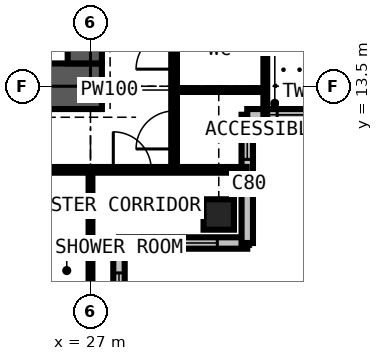
"""IFC4 building model, lengths in metres.
Left out: names, types, materials, properties, quantities, classifications, styles, units other than length and angle.
Written with IfcOpenShell. Run it as: python <this file> out.ifc"""

import sys

from ifc_helpers import new_model, si_unit, direction, frame, frame_2d, origin, origin_2d, place, context, subcontext, project, spatial, rectangle, extrude, element, fill, save


model = new_model("IFC4")
c1 = context("Model", 3, precision=1e-05, world=origin(), true_north=direction((0.0, 1.0)))
c2 = subcontext(c1, "Body", "Model", "MODEL_VIEW")
j1 = project(units=[si_unit("LENGTHUNIT", "METRE"), si_unit("PLANEANGLEUNIT", "RADIAN")], contexts=[c1])
p1 = place(None, origin())
s1 = spatial("IfcSite", under=j1, at=p1, CompositionType="ELEMENT")
p2 = place(p1, origin())
s2 = spatial("IfcBuilding", under=s1, at=p2, CompositionType="ELEMENT")
p3 = place(p2, frame((0.0, 0.0, 251.1)))
s3 = spatial("IfcBuildingStorey", under=s2, at=p3, CompositionType="ELEMENT", Elevation=251.1)
p4 = place(p3, frame((30.375, 10.125, 0.0), z_axis=(0.0, 0.0, 1.0), x_axis=(1.0, 0.0, 0.0)))
e1 = element("IfcColumn", 1, at=p4, inside=s3, PredefinedType="COLUMN", context=c2, shape_type="SweptSolid", body=[
    extrude(rectangle(XDim=0.8, YDim=0.8, at=origin_2d()), origin(), (0.0, 0.0, 1.0), 3.6),
])
p5 = place(p3, frame((13.2, 13.5, 0.0), z_axis=(0.0, 0.0, 1.0), x_axis=(1.0, 0.0, 0.0)))
e2 = element("IfcWall", 2, at=p5, inside=s3, PredefinedType="SHEAR", context=c2, shape_type="SweptSolid", body=[
    extrude(rectangle(XDim=14.1, YDim=1.2, at=frame_2d((7.05, 0.0))), origin(), (0.0, 0.0, 1.0), 3.6),
])
p6 = place(p3, frame((26.85, 14.1, 0.0), z_axis=(0.0, 0.0, 1.0), x_axis=(0.0, 1.0, 0.0)))
e3 = element("IfcWall", 3, at=p6, inside=s3, PredefinedType="SHEAR", context=c2, shape_type="SweptSolid", body=[
    extrude(rectangle(XDim=12.3, YDim=0.9, at=frame_2d((6.15, 0.0))), origin(), (0.0, 0.0, 1.0), 3.6),
])
p7 = place(p6, frame((3.65, 0.0, 0.0)))
e4 = element("IfcOpeningElement", 4, at=p7, cuts=e3, PredefinedType="OPENING", context=c2, shape_type="SweptSolid", body=[
    extrude(rectangle(XDim=1.2, YDim=2.2, at=frame_2d((0.6, 1.1))), frame((0.0, 0.46, 0.0), z_axis=(0.0, -1.0, 0.0), x_axis=(1.0, 0.0, 0.0)), (0.0, 0.0, 1.0), 0.92),
])
p8 = place(p3, frame((27.75, 6.0, 0.0), z_axis=(0.0, 0.0, 1.0), x_axis=(0.0, 1.0, 0.0)))
e5 = element("IfcWall", 5, at=p8, inside=s3, PredefinedType="SOLIDWALL", context=c2, shape_type="SweptSolid", body=[
    extrude(rectangle(XDim=3.375, YDim=0.3, at=frame_2d((1.688, 0.0))), origin(), (0.0, 0.0, 1.0), 3.3),
])
p9 = place(p8, frame((0.788, 0.0, 0.6)))
e6 = element("IfcOpeningElement", 6, at=p9, cuts=e5, PredefinedType="OPENING", context=c2, shape_type="SweptSolid", body=[
    extrude(rectangle(XDim=1.8, YDim=2.1, at=frame_2d((0.9, 1.05))), frame((0.0, 0.16, 0.0), z_axis=(0.0, -1.0, 0.0), x_axis=(1.0, 0.0, 0.0)), (0.0, 0.0, 1.0), 0.32),
])
p10 = place(p3, frame((27.75, 9.375, 0.0), z_axis=(0.0, 0.0, 1.0), x_axis=(1.0, 0.0, 0.0)))
e7 = element("IfcWall", 7, at=p10, inside=s3, PredefinedType="SOLIDWALL", context=c2, shape_type="SweptSolid", body=[
    extrude(rectangle(XDim=3.375, YDim=0.3, at=frame_2d((1.688, 0.0))), origin(), (0.0, 0.0, 1.0), 3.3),
])
p11 = place(p10, frame((0.788, 0.0, 0.6)))
e8 = element("IfcOpeningElement", 8, at=p11, cuts=e7, PredefinedType="OPENING", context=c2, shape_type="SweptSolid", body=[
    extrude(rectangle(XDim=1.8, YDim=2.1, at=frame_2d((0.9, 1.05))), frame((0.0, 0.16, 0.0), z_axis=(0.0, -1.0, 0.0), x_axis=(1.0, 0.0, 0.0)), (0.0, 0.0, 1.0), 0.32),
])
p12 = place(p3, frame((31.125, 9.375, 0.0), z_axis=(0.0, 0.0, 1.0), x_axis=(0.0, 1.0, 0.0)))
e9 = element("IfcWall", 9, at=p12, inside=s3, PredefinedType="SOLIDWALL", context=c2, shape_type="SweptSolid", body=[
    extrude(rectangle(XDim=3.375, YDim=0.3, at=frame_2d((1.688, 0.0))), origin(), (0.0, 0.0, 1.0), 3.3),
])
p13 = place(p12, frame((2.2, 0.0, 0.9)))
e10 = element("IfcOpeningElement", 10, at=p13, cuts=e9, PredefinedType="OPENING", context=c2, shape_type="SweptSolid", body=[
    extrude(rectangle(XDim=0.9, YDim=1.8, at=frame_2d((0.45, 0.9))), frame((0.0, 0.16, 0.0), z_axis=(0.0, -1.0, 0.0), x_axis=(1.0, 0.0, 0.0)), (0.0, 0.0, 1.0), 0.32),
])
p14 = place(p3, frame((31.125, 12.75, 0.0), z_axis=(0.0, 0.0, 1.0), x_axis=(1.0, 0.0, 0.0)))
e11 = element("IfcWall", 11, at=p14, inside=s3, PredefinedType="SOLIDWALL", context=c2, shape_type="SweptSolid", body=[
    extrude(rectangle(XDim=3.375, YDim=0.3, at=frame_2d((1.688, 0.0))), origin(), (0.0, 0.0, 1.0), 3.3),
])
p15 = place(p14, frame((0.788, 0.0, 0.6)))
e12 = element("IfcOpeningElement", 12, at=p15, cuts=e11, PredefinedType="OPENING", context=c2, shape_type="SweptSolid", body=[
    extrude(rectangle(XDim=1.8, YDim=2.1, at=frame_2d((0.9, 1.05))), frame((0.0, 0.16, 0.0), z_axis=(0.0, -1.0, 0.0), x_axis=(1.0, 0.0, 0.0)), (0.0, 0.0, 1.0), 0.32),
])
p16 = place(p3, frame((10.125, 11.3, 0.0), z_axis=(0.0, 0.0, 1.0), x_axis=(1.0, 0.0, 0.0)))
e13 = element("IfcWall", 13, at=p16, inside=s3, PredefinedType="PARTITIONING", context=c2, shape_type="SweptSolid", body=[
    extrude(rectangle(XDim=20.984, YDim=0.15, at=frame_2d((10.492, 0.0))), origin(), (0.0, 0.0, 1.0), 3.3),
])
p17 = place(p16, frame((3.625, 0.0, 0.0)))
e14 = element("IfcOpeningElement", 14, at=p17, cuts=e13, PredefinedType="OPENING", context=c2, shape_type="SweptSolid", body=[
    extrude(rectangle(XDim=0.95, YDim=2.2, at=frame_2d((0.475, 1.1))), frame((0.0, 0.085, 0.0), z_axis=(0.0, -1.0, 0.0), x_axis=(1.0, 0.0, 0.0)), (0.0, 0.0, 1.0), 0.17),
])
p18 = place(p16, frame((7.0, 0.0, 0.0)))
e15 = element("IfcOpeningElement", 15, at=p18, cuts=e13, PredefinedType="OPENING", context=c2, shape_type="SweptSolid", body=[
    extrude(rectangle(XDim=0.95, YDim=2.2, at=frame_2d((0.475, 1.1))), frame((0.0, 0.085, 0.0), z_axis=(0.0, -1.0, 0.0), x_axis=(1.0, 0.0, 0.0)), (0.0, 0.0, 1.0), 0.17),
])
p19 = place(p16, frame((10.375, 0.0, 0.0)))
e16 = element("IfcOpeningElement", 16, at=p19, cuts=e13, PredefinedType="OPENING", context=c2, shape_type="SweptSolid", body=[
    extrude(rectangle(XDim=0.95, YDim=2.2, at=frame_2d((0.475, 1.1))), frame((0.0, 0.085, 0.0), z_axis=(0.0, -1.0, 0.0), x_axis=(1.0, 0.0, 0.0)), (0.0, 0.0, 1.0), 0.17),
])
p20 = place(p16, frame((13.75, 0.0, 0.0)))
e17 = element("IfcOpeningElement", 17, at=p20, cuts=e13, PredefinedType="OPENING", context=c2, shape_type="SweptSolid", body=[
    extrude(rectangle(XDim=0.95, YDim=2.2, at=frame_2d((0.475, 1.1))), frame((0.0, 0.085, 0.0), z_axis=(0.0, -1.0, 0.0), x_axis=(1.0, 0.0, 0.0)), (0.0, 0.0, 1.0), 0.17),
])
p21 = place(p16, frame((17.475, 0.0, 0.0)))
e18 = element("IfcOpeningElement", 18, at=p21, cuts=e13, PredefinedType="OPENING", context=c2, shape_type="SweptSolid", body=[
    extrude(rectangle(XDim=1.0, YDim=2.2, at=frame_2d((0.5, 1.1))), frame((0.0, 0.085, 0.0), z_axis=(0.0, -1.0, 0.0), x_axis=(1.0, 0.0, 0.0)), (0.0, 0.0, 1.0), 0.17),
])
p22 = place(p3, frame((25.0, 9.1, 0.0), z_axis=(0.0, 0.0, 1.0), x_axis=(1.0, 0.0, 0.0)))
e19 = element("IfcWall", 19, at=p22, inside=s3, PredefinedType="PARTITIONING", context=c2, shape_type="SweptSolid", body=[
    extrude(rectangle(XDim=2.0, YDim=0.1, at=frame_2d((1.0, 0.0))), origin(), (0.0, 0.0, 1.0), 3.3),
])
p23 = place(p3, frame((27.0, 6.016, 0.0), z_axis=(0.0, 0.0, 1.0), x_axis=(0.0, 1.0, 0.0)))
e20 = element("IfcWall", 20, at=p23, inside=s3, PredefinedType="PARTITIONING", context=c2, shape_type="SweptSolid", body=[
    extrude(rectangle(XDim=3.084, YDim=0.1, at=frame_2d((1.542, 0.0))), origin(), (0.0, 0.0, 1.0), 2.802),
])
p24 = place(p23, frame((1.25, 0.0, 0.0)))
e21 = element("IfcOpeningElement", 21, at=p24, cuts=e20, PredefinedType="OPENING", context=c2, shape_type="SweptSolid", body=[
    extrude(rectangle(XDim=0.9, YDim=2.2, at=frame_2d((0.45, 1.1))), frame((0.0, 0.06, 0.0), z_axis=(0.0, -1.0, 0.0), x_axis=(1.0, 0.0, 0.0)), (0.0, 0.0, 1.0), 0.12),
])
p25 = place(p3, frame((27.0, 9.375, 0.0), z_axis=(0.0, 0.0, 1.0), x_axis=(0.0, 1.0, 0.0)))
e22 = element("IfcWall", 22, at=p25, inside=s3, PredefinedType="PARTITIONING", context=c2, shape_type="SweptSolid", body=[
    extrude(rectangle(XDim=1.925, YDim=0.1, at=frame_2d((0.962, 0.0))), origin(), (0.0, 0.0, 1.0), 2.802),
])
p26 = place(p3, frame((27.0, 9.375, 0.0), z_axis=(0.0, 0.0, 1.0), x_axis=(1.0, 0.0, 0.0)))
e23 = element("IfcWall", 23, at=p26, inside=s3, PredefinedType="PARTITIONING", context=c2, shape_type="SweptSolid", body=[
    extrude(rectangle(XDim=0.734, YDim=0.1, at=frame_2d((0.367, 0.0))), origin(), (0.0, 0.0, 1.0), 3.3),
])
p27 = place(p3, frame((29.2, 11.3, 0.0), z_axis=(0.0, 0.0, 1.0), x_axis=(0.0, 1.0, 0.0)))
e24 = element("IfcWall", 24, at=p27, inside=s3, PredefinedType="PARTITIONING", context=c2, shape_type="SweptSolid", body=[
    extrude(rectangle(XDim=19.809, YDim=0.15, at=frame_2d((9.904, 0.0))), origin(), (0.0, 0.0, 1.0), 3.3),
])
p28 = place(p27, frame((0.55, 0.0, 0.0)))
e25 = element("IfcOpeningElement", 25, at=p28, cuts=e24, PredefinedType="OPENING", context=c2, shape_type="SweptSolid", body=[
    extrude(rectangle(XDim=1.0, YDim=2.2, at=frame_2d((0.5, 1.1))), frame((0.0, 0.085, 0.0), z_axis=(0.0, -1.0, 0.0), x_axis=(1.0, 0.0, 0.0)), (0.0, 0.0, 1.0), 0.17),
])
p29 = place(p27, frame((2.65, 0.0, 0.0)))
e26 = element("IfcOpeningElement", 26, at=p29, cuts=e24, PredefinedType="OPENING", context=c2, shape_type="SweptSolid", body=[
    extrude(rectangle(XDim=1.0, YDim=2.2, at=frame_2d((0.5, 1.1))), frame((0.0, 0.085, 0.0), z_axis=(0.0, -1.0, 0.0), x_axis=(1.0, 0.0, 0.0)), (0.0, 0.0, 1.0), 0.17),
])
p30 = place(p27, frame((10.3, 0.0, 0.0)))
e27 = element("IfcOpeningElement", 27, at=p30, cuts=e24, PredefinedType="OPENING", context=c2, shape_type="SweptSolid", body=[
    extrude(rectangle(XDim=1.5, YDim=2.2, at=frame_2d((0.75, 1.1))), frame((0.0, 0.085, 0.0), z_axis=(0.0, -1.0, 0.0), x_axis=(1.0, 0.0, 0.0)), (0.0, 0.0, 1.0), 0.17),
])
p31 = place(p3, frame((29.2, 13.4, 0.0), z_axis=(0.0, 0.0, 1.0), x_axis=(1.0, 0.0, 0.0)))
e28 = element("IfcWall", 28, at=p31, inside=s3, PredefinedType="PARTITIONING", context=c2, shape_type="SweptSolid", body=[
    extrude(rectangle(XDim=2.4, YDim=0.1, at=frame_2d((1.2, 0.0))), origin(), (0.0, 0.0, 1.0), 2.802),
])
p32 = place(p3, frame((31.6, 12.766, 0.0), z_axis=(0.0, 0.0, 1.0), x_axis=(0.0, 1.0, 0.0)))
e29 = element("IfcWall", 29, at=p32, inside=s3, PredefinedType="PARTITIONING", context=c2, shape_type="SweptSolid", body=[
    extrude(rectangle(XDim=2.734, YDim=0.1, at=frame_2d((1.367, 0.0))), origin(), (0.0, 0.0, 1.0), 3.3),
])
p33 = place(p9, origin())
e30 = element("IfcWindow", 30, at=p33, inside=s3, PartitioningType="SINGLE_PANEL", PredefinedType="WINDOW", context=c2, shape_type="SweptSolid", body=[
    extrude(rectangle(XDim=1.8, YDim=2.1, at=frame_2d((0.9, 1.05))), frame((0.0, 0.03, 0.0), z_axis=(0.0, -1.0, 0.0), x_axis=(1.0, 0.0, 0.0)), (0.0, 0.0, 1.0), 0.06),
])
fill(e6, e30)
p34 = place(p11, origin())
e31 = element("IfcWindow", 31, at=p34, inside=s3, PartitioningType="SINGLE_PANEL", PredefinedType="WINDOW", context=c2, shape_type="SweptSolid", body=[
    extrude(rectangle(XDim=1.8, YDim=2.1, at=frame_2d((0.9, 1.05))), frame((0.0, 0.03, 0.0), z_axis=(0.0, -1.0, 0.0), x_axis=(1.0, 0.0, 0.0)), (0.0, 0.0, 1.0), 0.06),
])
fill(e8, e31)
p35 = place(p13, origin())
e32 = element("IfcWindow", 32, at=p35, inside=s3, PartitioningType="SINGLE_PANEL", PredefinedType="WINDOW", context=c2, shape_type="SweptSolid", body=[
    extrude(rectangle(XDim=0.9, YDim=1.8, at=frame_2d((0.45, 0.9))), frame((0.0, 0.03, 0.0), z_axis=(0.0, -1.0, 0.0), x_axis=(1.0, 0.0, 0.0)), (0.0, 0.0, 1.0), 0.06),
])
fill(e10, e32)
p36 = place(p15, origin())
e33 = element("IfcWindow", 33, at=p36, inside=s3, PartitioningType="SINGLE_PANEL", PredefinedType="WINDOW", context=c2, shape_type="SweptSolid", body=[
    extrude(rectangle(XDim=1.8, YDim=2.1, at=frame_2d((0.9, 1.05))), frame((0.0, 0.03, 0.0), z_axis=(0.0, -1.0, 0.0), x_axis=(1.0, 0.0, 0.0)), (0.0, 0.0, 1.0), 0.06),
])
fill(e12, e33)
p37 = place(p21, origin())
e34 = element("IfcDoor", 34, at=p37, inside=s3, OperationType="SINGLE_SWING_LEFT", PredefinedType="DOOR", context=c2, shape_type="SweptSolid", body=[
    extrude(rectangle(XDim=1.0, YDim=2.2, at=frame_2d((0.5, 1.1))), frame((0.0, 0.025, 0.0), z_axis=(0.0, -1.0, 0.0), x_axis=(1.0, 0.0, 0.0)), (0.0, 0.0, 1.0), 0.05),
])
fill(e18, e34)
p38 = place(p28, origin())
e35 = element("IfcDoor", 35, at=p38, inside=s3, OperationType="SINGLE_SWING_LEFT", PredefinedType="DOOR", context=c2, shape_type="SweptSolid", body=[
    extrude(rectangle(XDim=1.0, YDim=2.2, at=frame_2d((0.5, 1.1))), frame((0.0, 0.025, 0.0), z_axis=(0.0, -1.0, 0.0), x_axis=(1.0, 0.0, 0.0)), (0.0, 0.0, 1.0), 0.05),
])
fill(e25, e35)
p39 = place(p29, origin())
e36 = element("IfcDoor", 36, at=p39, inside=s3, OperationType="SINGLE_SWING_LEFT", PredefinedType="DOOR", context=c2, shape_type="SweptSolid", body=[
    extrude(rectangle(XDim=1.0, YDim=2.2, at=frame_2d((0.5, 1.1))), frame((0.0, 0.025, 0.0), z_axis=(0.0, -1.0, 0.0), x_axis=(1.0, 0.0, 0.0)), (0.0, 0.0, 1.0), 0.05),
])
fill(e26, e36)
save(model, sys.argv[1])
